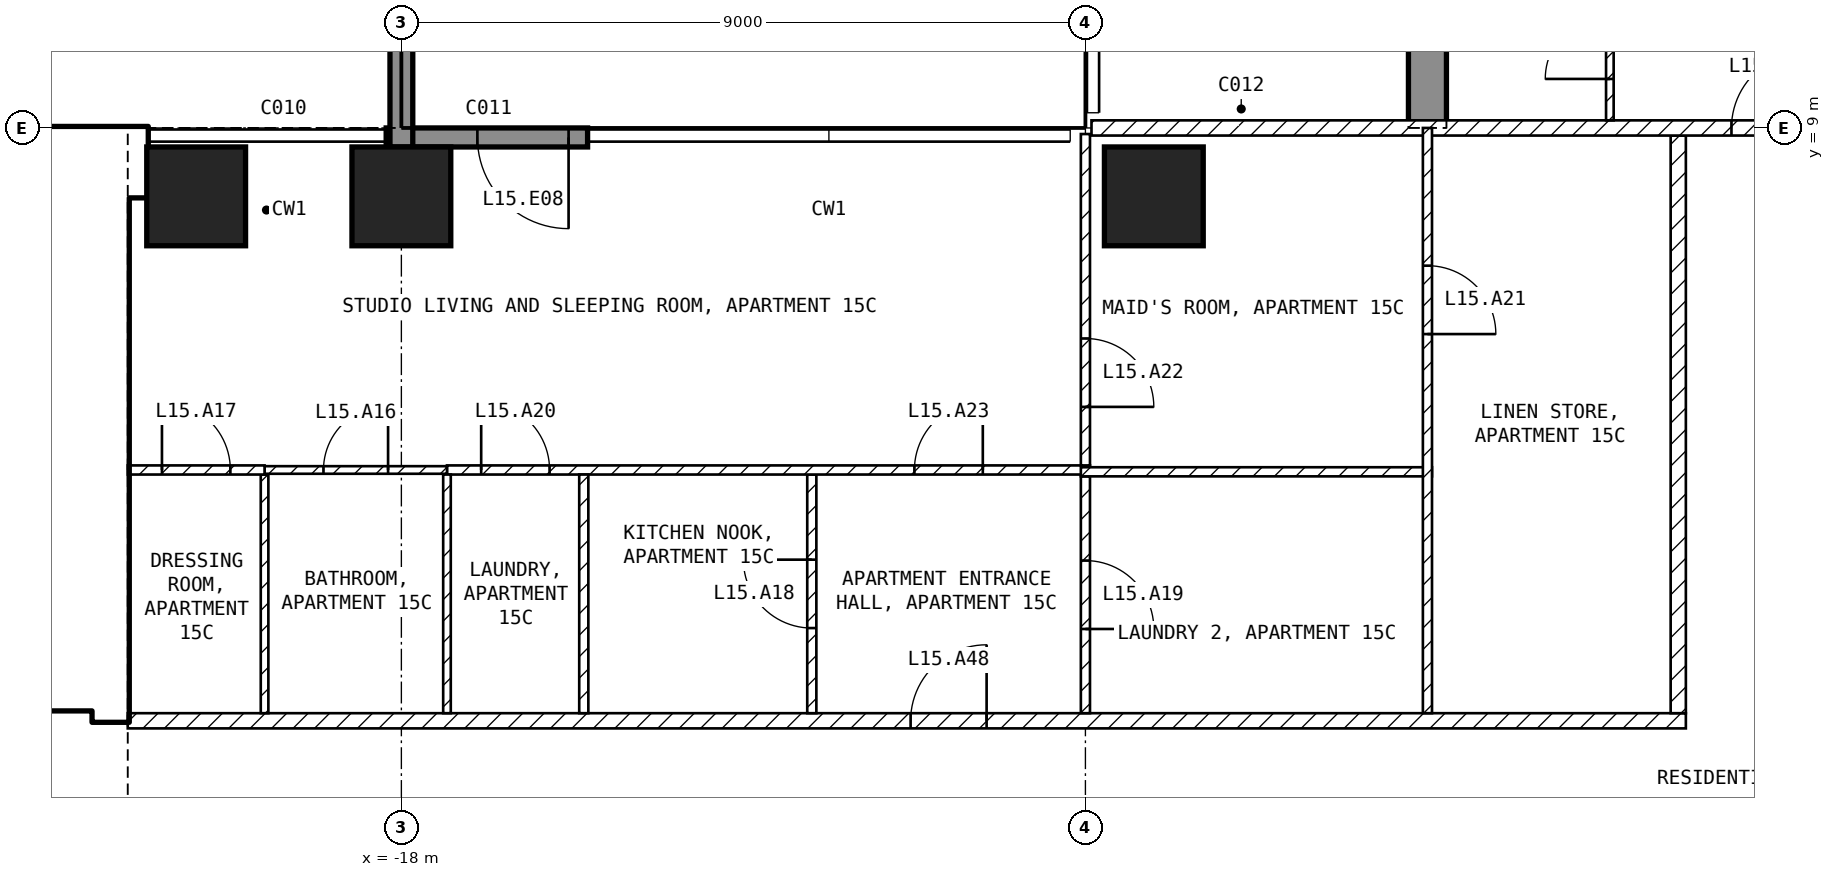
"""IFC4 building model, lengths in metres.
Left out: names, types, materials, properties, quantities, classifications, styles, units other than length and angle.
Written with IfcOpenShell. Run it as: python <this file> out.ifc"""

import sys

from ifc_helpers import new_model, si_unit, direction, frame, frame_2d, origin, origin_2d, place, context, subcontext, project, spatial, polyline, rectangle, outline, extrude, element, fill, save


model = new_model("IFC4")
c1 = context("Model", 3, precision=1e-05, world=origin(), true_north=direction((0.0, 1.0)))
c2 = subcontext(c1, "Body", "Model", "MODEL_VIEW")
j1 = project(units=[si_unit("LENGTHUNIT", "METRE"), si_unit("PLANEANGLEUNIT", "RADIAN")], contexts=[c1])
p1 = place(None, origin())
s1 = spatial("IfcSite", under=j1, at=p1, CompositionType="ELEMENT")
p2 = place(p1, origin())
s2 = spatial("IfcBuilding", under=s1, at=p2, CompositionType="ELEMENT")
p3 = place(p2, frame((0.0, 0.0, 71.5)))
s3 = spatial("IfcBuildingStorey", under=s2, at=p3, CompositionType="ELEMENT", Elevation=71.5)
for number, where, z_axis, x_axis in (
    (1, (-20.7, 8.1, -0.25), (0.0, 0.0, 1.0), (1.0, 0.0, 0.0)),
    (2, (-18.0, 8.1, -0.25), (0.0, 0.0, 1.0), (1.0, 0.0, 0.0)),
    (3, (-8.1, 8.1, -0.25), (0.0, 0.0, 1.0), (1.0, 0.0, 0.0)),
):
    element("IfcColumn", number, at=place(p3, frame(where, z_axis=z_axis, x_axis=x_axis)), inside=s3, PredefinedType="COLUMN", context=c2, shape_type="SweptSolid", body=[
        extrude(rectangle(XDim=1.3, YDim=1.3, at=origin_2d()), origin(), (0.0, 0.0, 1.0), 3.5),
    ])
p4 = place(p3, frame((-4.75, 9.0, -0.25), z_axis=(1.0, 0.0, 0.0), x_axis=(0.0, 1.0, 0.0)))
e4 = element("IfcWall", 4, at=p4, inside=s3, PredefinedType="SHEAR", context=c2, shape_type="SweptSolid", body=[
    extrude(outline(polyline([(0.0, 0.0), (2.1, 0.0), (2.1, 2.65), (4.5, 2.65), (4.5, 0.0), (9.9, 0.0), (9.9, 2.65), (12.3, 2.65), (12.3, 0.0), (16.45, 0.0), (16.45, 3.5), (0.0, 3.5), (0.0, 0.0)])), origin(), (0.0, 0.0, 1.0), 0.5),
])
p5 = place(p3, frame((-15.55, 8.875, 0.0), z_axis=(0.0, 0.0, 1.0), x_axis=(-1.0, 0.0, 0.0)))
e5 = element("IfcWall", 5, at=p5, inside=s3, PredefinedType="SOLIDWALL", context=c2, shape_type="SweptSolid", body=[
    extrude(rectangle(XDim=2.65, YDim=0.25, at=frame_2d((1.325, 0.0))), origin(), (0.0, 0.0, 1.0), 3.25),
])
p6 = place(p5, frame((0.25, 0.0, 0.0)))
e6 = element("IfcOpeningElement", 6, at=p6, cuts=e5, PredefinedType="OPENING", context=c2, shape_type="SweptSolid", body=[
    extrude(rectangle(XDim=1.2, YDim=2.4, at=frame_2d((0.6, 1.2))), frame((0.0, 0.135, 0.0), z_axis=(0.0, -1.0, 0.0), x_axis=(1.0, 0.0, 0.0)), (0.0, 0.0, 1.0), 0.27),
])
p7 = place(p3, frame((-18.0, 8.75, 0.0), z_axis=(0.0, 0.0, 1.0), x_axis=(0.0, 1.0, 0.0)))
e7 = element("IfcWall", 7, at=p7, inside=s3, PredefinedType="SOLIDWALL", context=c2, shape_type="SweptSolid", body=[
    extrude(rectangle(XDim=2.95, YDim=0.3, at=frame_2d((1.475, 0.0))), origin(), (0.0, 0.0, 1.0), 3.25),
])
p8 = place(p3, frame((-31.5, 8.55, 0.0), z_axis=(0.0, 0.0, 1.0), x_axis=(1.0, 0.0, 0.0)))
e8 = element("IfcWall", 8, at=p8, inside=s3, PredefinedType="SHEAR", context=c2, shape_type="SweptSolid", body=[
    extrude(rectangle(XDim=10.15, YDim=0.9, at=frame_2d((5.075, 0.0))), origin(), (0.0, 0.0, 1.0), 3.25),
])
p9 = place(p3, frame((-21.825, 1.2, 0.0), z_axis=(0.0, 0.0, 1.0), x_axis=(0.0, 1.0, 0.0)))
e9 = element("IfcWall", 9, at=p9, inside=s3, PredefinedType="SHEAR", context=c2, shape_type="SweptSolid", body=[
    extrude(rectangle(XDim=6.9, YDim=0.45, at=frame_2d((3.45, 0.0))), origin(), (0.0, 0.0, 1.0), 3.25),
])
p10 = place(p3, frame((-35.1, 1.45, 0.0), z_axis=(0.0, 0.0, 1.0), x_axis=(1.0, 0.0, 0.0)))
e10 = element("IfcWall", 10, at=p10, inside=s3, PredefinedType="SOLIDWALL", context=c2, shape_type="SweptSolid", body=[
    extrude(rectangle(XDim=13.05, YDim=0.2, at=frame_2d((6.525, 0.0))), origin(), (0.0, 0.0, 1.0), 3.25),
])
p11 = place(p10, frame((11.3, 0.0, 0.0)))
e11 = element("IfcOpeningElement", 11, at=p11, cuts=e10, PredefinedType="OPENING", context=c2, shape_type="SweptSolid", body=[
    extrude(rectangle(XDim=1.0, YDim=2.1, at=frame_2d((0.5, 1.05))), frame((0.0, 0.11, 0.0), z_axis=(0.0, -1.0, 0.0), x_axis=(1.0, 0.0, 0.0)), (0.0, 0.0, 1.0), 0.22),
])
p12 = place(p10, frame((8.8, 0.0, 0.0)))
e12 = element("IfcOpeningElement", 12, at=p12, cuts=e10, PredefinedType="OPENING", context=c2, shape_type="SweptSolid", body=[
    extrude(rectangle(XDim=1.0, YDim=2.1, at=frame_2d((0.5, 1.05))), frame((0.0, 0.11, 0.0), z_axis=(0.0, -1.0, 0.0), x_axis=(1.0, 0.0, 0.0)), (0.0, 0.0, 1.0), 0.22),
])
p13 = place(p3, frame((-28.35, 5.15, 0.0), z_axis=(0.0, 0.0, 1.0), x_axis=(1.0, 0.0, 0.0)))
e13 = element("IfcWall", 13, at=p13, inside=s3, PredefinedType="SOLIDWALL", context=c2, shape_type="SweptSolid", body=[
    extrude(rectangle(XDim=6.3, YDim=0.2, at=frame_2d((3.15, 0.0))), origin(), (0.0, 0.0, 1.0), 3.25),
])
p14 = place(p13, frame((5.1, 0.0, 0.0)))
e14 = element("IfcOpeningElement", 14, at=p14, cuts=e13, PredefinedType="OPENING", context=c2, shape_type="SweptSolid", body=[
    extrude(rectangle(XDim=1.0, YDim=2.1, at=frame_2d((0.5, 1.05))), frame((0.0, 0.11, 0.0), z_axis=(0.0, -1.0, 0.0), x_axis=(1.0, 0.0, 0.0)), (0.0, 0.0, 1.0), 0.22),
])
p15 = place(p3, frame((-21.6, 1.2, 0.0), z_axis=(0.0, 0.0, 1.0), x_axis=(1.0, 0.0, 0.0)))
e15 = element("IfcWall", 15, at=p15, inside=s3, PredefinedType="PARTITIONING", context=c2, shape_type="SweptSolid", body=[
    extrude(rectangle(XDim=20.5, YDim=0.2, at=frame_2d((10.25, 0.0))), origin(), (0.0, 0.0, 1.0), 3.25),
])
p16 = place(p15, frame((10.3, 0.0, 0.0)))
e16 = element("IfcOpeningElement", 16, at=p16, cuts=e15, PredefinedType="OPENING", context=c2, shape_type="SweptSolid", body=[
    extrude(rectangle(XDim=1.0, YDim=2.1, at=frame_2d((0.5, 1.05))), frame((0.0, 0.11, 0.0), z_axis=(0.0, -1.0, 0.0), x_axis=(1.0, 0.0, 0.0)), (0.0, 0.0, 1.0), 0.22),
])
p17 = place(p3, frame((-1.2, 1.3, 0.0), z_axis=(0.0, 0.0, 1.0), x_axis=(0.0, 1.0, 0.0)))
e17 = element("IfcWall", 17, at=p17, inside=s3, PredefinedType="PARTITIONING", context=c2, shape_type="SweptSolid", body=[
    extrude(rectangle(XDim=7.6, YDim=0.2, at=frame_2d((3.8, 0.0))), origin(), (0.0, 0.0, 1.0), 3.25),
])
p18 = place(p3, frame((-8.92, 9.0, 0.0), z_axis=(0.0, 0.0, 1.0), x_axis=(1.0, 0.0, 0.0)))
e18 = element("IfcWall", 18, at=p18, inside=s3, PredefinedType="PARTITIONING", context=c2, shape_type="SweptSolid", body=[
    extrude(rectangle(XDim=17.84, YDim=0.2, at=frame_2d((8.92, 0.0))), origin(), (0.0, 0.0, 1.0), 3.25),
])
p19 = place(p18, frame((8.42, 0.0, 0.0)))
e19 = element("IfcOpeningElement", 19, at=p19, cuts=e18, PredefinedType="OPENING", context=c2, shape_type="SweptSolid", body=[
    extrude(rectangle(XDim=1.0, YDim=2.1, at=frame_2d((0.5, 1.05))), frame((0.0, 0.11, 0.0), z_axis=(0.0, -1.0, 0.0), x_axis=(1.0, 0.0, 0.0)), (0.0, 0.0, 1.0), 0.22),
])
p20 = place(p3, frame((-12.6, 1.3, 0.0), z_axis=(0.0, 0.0, 1.0), x_axis=(0.0, 1.0, 0.0)))
e20 = element("IfcWall", 20, at=p20, inside=s3, PredefinedType="PARTITIONING", context=c2, shape_type="SweptSolid", body=[
    extrude(rectangle(XDim=3.14, YDim=0.12, at=frame_2d((1.57, 0.0))), origin(), (0.0, 0.0, 1.0), 3.25),
])
p21 = place(p20, frame((1.12, 0.0, 0.0)))
e21 = element("IfcOpeningElement", 21, at=p21, cuts=e20, PredefinedType="OPENING", context=c2, shape_type="SweptSolid", body=[
    extrude(rectangle(XDim=0.9, YDim=2.1, at=frame_2d((0.45, 1.05))), frame((0.0, 0.07, 0.0), z_axis=(0.0, -1.0, 0.0), x_axis=(1.0, 0.0, 0.0)), (0.0, 0.0, 1.0), 0.14),
])
p22 = place(p3, frame((-17.4, 4.5, 0.0), z_axis=(0.0, 0.0, 1.0), x_axis=(1.0, 0.0, 0.0)))
e22 = element("IfcWall", 22, at=p22, inside=s3, PredefinedType="PARTITIONING", context=c2, shape_type="SweptSolid", body=[
    extrude(rectangle(XDim=8.46, YDim=0.12, at=frame_2d((4.23, 0.0))), origin(), (0.0, 0.0, 1.0), 3.25),
])
p23 = place(p22, frame((0.45, 0.0, 0.0)))
e23 = element("IfcOpeningElement", 23, at=p23, cuts=e22, PredefinedType="OPENING", context=c2, shape_type="SweptSolid", body=[
    extrude(rectangle(XDim=0.9, YDim=2.1, at=frame_2d((0.45, 1.05))), frame((0.0, 0.07, 0.0), z_axis=(0.0, -1.0, 0.0), x_axis=(1.0, 0.0, 0.0)), (0.0, 0.0, 1.0), 0.14),
])
p24 = place(p22, frame((6.15, 0.0, 0.0)))
e24 = element("IfcOpeningElement", 24, at=p24, cuts=e22, PredefinedType="OPENING", context=c2, shape_type="SweptSolid", body=[
    extrude(rectangle(XDim=0.9, YDim=2.1, at=frame_2d((0.45, 1.05))), frame((0.0, 0.07, 0.0), z_axis=(0.0, -1.0, 0.0), x_axis=(1.0, 0.0, 0.0)), (0.0, 0.0, 1.0), 0.14),
])
p25 = place(p3, frame((-9.0, 4.416, 0.0), z_axis=(0.0, 0.0, 1.0), x_axis=(0.0, -1.0, 0.0)))
e25 = element("IfcWall", 25, at=p25, inside=s3, PredefinedType="PARTITIONING", context=c2, shape_type="SweptSolid", body=[
    extrude(rectangle(XDim=3.116, YDim=0.12, at=frame_2d((1.558, 0.0))), origin(), (0.0, 0.0, 1.0), 3.25),
])
p26 = place(p25, frame((1.108, 0.0, 0.0)))
e26 = element("IfcOpeningElement", 26, at=p26, cuts=e25, PredefinedType="OPENING", context=c2, shape_type="SweptSolid", body=[
    extrude(rectangle(XDim=0.9, YDim=2.1, at=frame_2d((0.45, 1.05))), frame((0.0, 0.07, 0.0), z_axis=(0.0, -1.0, 0.0), x_axis=(1.0, 0.0, 0.0)), (0.0, 0.0, 1.0), 0.14),
])
p27 = place(p3, frame((-15.6, 1.3, 0.0), z_axis=(0.0, 0.0, 1.0), x_axis=(0.0, 1.0, 0.0)))
e27 = element("IfcWall", 27, at=p27, inside=s3, PredefinedType="PARTITIONING", context=c2, shape_type="SweptSolid", body=[
    extrude(rectangle(XDim=3.14, YDim=0.12, at=frame_2d((1.57, 0.0))), origin(), (0.0, 0.0, 1.0), 3.25),
])
for number, where, z_axis, x_axis in (
    (28, (-17.4, 1.3, 0.0), (0.0, 0.0, 1.0), (0.0, 1.0, 0.0)),
    (29, (-19.8, 1.3, 0.0), (0.0, 0.0, 1.0), (0.0, 1.0, 0.0)),
):
    element("IfcWall", number, at=place(p3, frame(where, z_axis=z_axis, x_axis=x_axis)), inside=s3, PredefinedType="PARTITIONING", context=c2, shape_type="SweptSolid", body=[
        extrude(rectangle(XDim=3.14, YDim=0.1, at=frame_2d((1.57, 0.0))), origin(), (0.0, 0.0, 1.0), 3.25),
    ])
p28 = place(p3, frame((-19.8, 4.5, 0.0), z_axis=(0.0, 0.0, 1.0), x_axis=(1.0, 0.0, 0.0)))
e30 = element("IfcWall", 30, at=p28, inside=s3, PredefinedType="PARTITIONING", context=c2, shape_type="SweptSolid", body=[
    extrude(rectangle(XDim=2.4, YDim=0.1, at=frame_2d((1.2, 0.0))), origin(), (0.0, 0.0, 1.0), 3.25),
])
p29 = place(p28, frame((0.775, 0.0, 0.0)))
e31 = element("IfcOpeningElement", 31, at=p29, cuts=e30, PredefinedType="OPENING", context=c2, shape_type="SweptSolid", body=[
    extrude(rectangle(XDim=0.85, YDim=2.1, at=frame_2d((0.425, 1.05))), frame((0.0, 0.06, 0.0), z_axis=(0.0, -1.0, 0.0), x_axis=(1.0, 0.0, 0.0)), (0.0, 0.0, 1.0), 0.12),
])
p30 = place(p3, frame((-21.6, 4.5, 0.0), z_axis=(0.0, 0.0, 1.0), x_axis=(1.0, 0.0, 0.0)))
e32 = element("IfcWall", 32, at=p30, inside=s3, PredefinedType="PARTITIONING", context=c2, shape_type="SweptSolid", body=[
    extrude(rectangle(XDim=1.8, YDim=0.12, at=frame_2d((0.9, 0.0))), origin(), (0.0, 0.0, 1.0), 3.25),
])
p31 = place(p30, frame((0.45, 0.0, 0.0)))
e33 = element("IfcOpeningElement", 33, at=p31, cuts=e32, PredefinedType="OPENING", context=c2, shape_type="SweptSolid", body=[
    extrude(rectangle(XDim=0.9, YDim=2.1, at=frame_2d((0.45, 1.05))), frame((0.0, 0.07, 0.0), z_axis=(0.0, -1.0, 0.0), x_axis=(1.0, 0.0, 0.0)), (0.0, 0.0, 1.0), 0.14),
])
p32 = place(p3, frame((-9.0, 8.92, 0.0), z_axis=(0.0, 0.0, 1.0), x_axis=(0.0, -1.0, 0.0)))
e34 = element("IfcWall", 34, at=p32, inside=s3, PredefinedType="PARTITIONING", context=c2, shape_type="SweptSolid", body=[
    extrude(rectangle(XDim=4.36, YDim=0.12, at=frame_2d((2.18, 0.0))), origin(), (0.0, 0.0, 1.0), 3.25),
])
p33 = place(p32, frame((2.69, 0.0, 0.0)))
e35 = element("IfcOpeningElement", 35, at=p33, cuts=e34, PredefinedType="OPENING", context=c2, shape_type="SweptSolid", body=[
    extrude(rectangle(XDim=0.9, YDim=2.1, at=frame_2d((0.45, 1.05))), frame((0.0, 0.07, 0.0), z_axis=(0.0, -1.0, 0.0), x_axis=(1.0, 0.0, 0.0)), (0.0, 0.0, 1.0), 0.14),
])
p34 = place(p3, frame((-9.06, 4.476, 0.0), z_axis=(0.0, 0.0, 1.0), x_axis=(1.0, 0.0, 0.0)))
e36 = element("IfcWall", 36, at=p34, inside=s3, PredefinedType="PARTITIONING", context=c2, shape_type="SweptSolid", body=[
    extrude(rectangle(XDim=4.62, YDim=0.12, at=frame_2d((2.31, 0.0))), origin(), (0.0, 0.0, 1.0), 3.25),
])
p35 = place(p3, frame((-4.5, 9.0, 0.0), z_axis=(0.0, 0.0, 1.0), x_axis=(0.0, -1.0, 0.0)))
e37 = element("IfcWall", 37, at=p35, inside=s3, PredefinedType="PARTITIONING", context=c2, shape_type="SweptSolid", body=[
    extrude(rectangle(XDim=7.7, YDim=0.12, at=frame_2d((3.85, 0.0))), origin(), (0.0, 0.0, 1.0), 3.25),
])
p36 = place(p35, frame((1.812, 0.0, 0.0)))
e38 = element("IfcOpeningElement", 38, at=p36, cuts=e37, PredefinedType="OPENING", context=c2, shape_type="SweptSolid", body=[
    extrude(rectangle(XDim=0.9, YDim=2.1, at=frame_2d((0.45, 1.05))), frame((0.0, 0.07, 0.0), z_axis=(0.0, -1.0, 0.0), x_axis=(1.0, 0.0, 0.0)), (0.0, 0.0, 1.0), 0.14),
])
p37 = place(p3, frame((-2.1, 9.1, 0.0), z_axis=(0.0, 0.0, 1.0), x_axis=(0.0, 1.0, 0.0)))
e39 = element("IfcWall", 39, at=p37, inside=s3, PredefinedType="PARTITIONING", context=c2, shape_type="SweptSolid", body=[
    extrude(rectangle(XDim=1.94, YDim=0.1, at=frame_2d((0.97, 0.0))), origin(), (0.0, 0.0, 1.0), 3.25),
])
p38 = place(p37, frame((0.545, 0.0, 0.0)))
e40 = element("IfcOpeningElement", 40, at=p38, cuts=e39, PredefinedType="OPENING", context=c2, shape_type="SweptSolid", body=[
    extrude(rectangle(XDim=0.85, YDim=2.1, at=frame_2d((0.425, 1.05))), frame((0.0, 0.06, 0.0), z_axis=(0.0, -1.0, 0.0), x_axis=(1.0, 0.0, 0.0)), (0.0, 0.0, 1.0), 0.12),
])
p39 = place(p6, origin())
e41 = element("IfcDoor", 41, at=p39, inside=s3, OperationType="SINGLE_SWING_LEFT", PredefinedType="DOOR", context=c2, shape_type="SweptSolid", body=[
    extrude(rectangle(XDim=1.2, YDim=2.4, at=frame_2d((0.6, 1.2))), frame((0.0, 0.025, 0.0), z_axis=(0.0, -1.0, 0.0), x_axis=(1.0, 0.0, 0.0)), (0.0, 0.0, 1.0), 0.05),
])
fill(e6, e41)
p40 = place(p14, origin())
e42 = element("IfcDoor", 42, at=p40, inside=s3, OperationType="SINGLE_SWING_LEFT", PredefinedType="DOOR", context=c2, shape_type="SweptSolid", body=[
    extrude(rectangle(XDim=1.0, YDim=2.1, at=frame_2d((0.5, 1.05))), frame((0.0, 0.025, 0.0), z_axis=(0.0, -1.0, 0.0), x_axis=(1.0, 0.0, 0.0)), (0.0, 0.0, 1.0), 0.05),
])
fill(e14, e42)
p41 = place(p29, origin())
e43 = element("IfcDoor", 43, at=p41, inside=s3, OperationType="SINGLE_SWING_RIGHT", PredefinedType="DOOR", context=c2, shape_type="SweptSolid", body=[
    extrude(rectangle(XDim=0.85, YDim=2.1, at=frame_2d((0.425, 1.05))), frame((0.0, 0.025, 0.0), z_axis=(0.0, -1.0, 0.0), x_axis=(1.0, 0.0, 0.0)), (0.0, 0.0, 1.0), 0.05),
])
fill(e31, e43)
p42 = place(p31, origin())
e44 = element("IfcDoor", 44, at=p42, inside=s3, OperationType="SINGLE_SWING_LEFT", PredefinedType="DOOR", context=c2, shape_type="SweptSolid", body=[
    extrude(rectangle(XDim=0.9, YDim=2.1, at=frame_2d((0.45, 1.05))), frame((0.0, 0.025, 0.0), z_axis=(0.0, -1.0, 0.0), x_axis=(1.0, 0.0, 0.0)), (0.0, 0.0, 1.0), 0.05),
])
fill(e33, e44)
p43 = place(p21, origin())
e45 = element("IfcDoor", 45, at=p43, inside=s3, OperationType="SINGLE_SWING_RIGHT", PredefinedType="DOOR", context=c2, shape_type="SweptSolid", body=[
    extrude(rectangle(XDim=0.9, YDim=2.1, at=frame_2d((0.45, 1.05))), frame((0.0, 0.025, 0.0), z_axis=(0.0, -1.0, 0.0), x_axis=(1.0, 0.0, 0.0)), (0.0, 0.0, 1.0), 0.05),
])
fill(e21, e45)
p44 = place(p26, origin())
e46 = element("IfcDoor", 46, at=p44, inside=s3, OperationType="SINGLE_SWING_RIGHT", PredefinedType="DOOR", context=c2, shape_type="SweptSolid", body=[
    extrude(rectangle(XDim=0.9, YDim=2.1, at=frame_2d((0.45, 1.05))), frame((0.0, 0.025, 0.0), z_axis=(0.0, -1.0, 0.0), x_axis=(1.0, 0.0, 0.0)), (0.0, 0.0, 1.0), 0.05),
])
fill(e26, e46)
p45 = place(p23, origin())
e47 = element("IfcDoor", 47, at=p45, inside=s3, OperationType="SINGLE_SWING_LEFT", PredefinedType="DOOR", context=c2, shape_type="SweptSolid", body=[
    extrude(rectangle(XDim=0.9, YDim=2.1, at=frame_2d((0.45, 1.05))), frame((0.0, 0.025, 0.0), z_axis=(0.0, -1.0, 0.0), x_axis=(1.0, 0.0, 0.0)), (0.0, 0.0, 1.0), 0.05),
])
fill(e23, e47)
p46 = place(p36, origin())
e48 = element("IfcDoor", 48, at=p46, inside=s3, OperationType="SINGLE_SWING_RIGHT", PredefinedType="DOOR", context=c2, shape_type="SweptSolid", body=[
    extrude(rectangle(XDim=0.9, YDim=2.1, at=frame_2d((0.45, 1.05))), frame((0.0, 0.025, 0.0), z_axis=(0.0, -1.0, 0.0), x_axis=(1.0, 0.0, 0.0)), (0.0, 0.0, 1.0), 0.05),
])
fill(e38, e48)
p47 = place(p33, origin())
e49 = element("IfcDoor", 49, at=p47, inside=s3, OperationType="SINGLE_SWING_RIGHT", PredefinedType="DOOR", context=c2, shape_type="SweptSolid", body=[
    extrude(rectangle(XDim=0.9, YDim=2.1, at=frame_2d((0.45, 1.05))), frame((0.0, 0.025, 0.0), z_axis=(0.0, -1.0, 0.0), x_axis=(1.0, 0.0, 0.0)), (0.0, 0.0, 1.0), 0.05),
])
fill(e35, e49)
p48 = place(p24, origin())
e50 = element("IfcDoor", 50, at=p48, inside=s3, OperationType="SINGLE_SWING_RIGHT", PredefinedType="DOOR", context=c2, shape_type="SweptSolid", body=[
    extrude(rectangle(XDim=0.9, YDim=2.1, at=frame_2d((0.45, 1.05))), frame((0.0, 0.025, 0.0), z_axis=(0.0, -1.0, 0.0), x_axis=(1.0, 0.0, 0.0)), (0.0, 0.0, 1.0), 0.05),
])
fill(e24, e50)
p49 = place(p19, origin())
e51 = element("IfcDoor", 51, at=p49, inside=s3, OperationType="SINGLE_SWING_RIGHT", PredefinedType="DOOR", context=c2, shape_type="SweptSolid", body=[
    extrude(rectangle(XDim=1.0, YDim=2.1, at=frame_2d((0.5, 1.05))), frame((0.0, 0.025, 0.0), z_axis=(0.0, -1.0, 0.0), x_axis=(1.0, 0.0, 0.0)), (0.0, 0.0, 1.0), 0.05),
])
fill(e19, e51)
p50 = place(p38, origin())
e52 = element("IfcDoor", 52, at=p50, inside=s3, OperationType="SINGLE_SWING_LEFT", PredefinedType="DOOR", context=c2, shape_type="SweptSolid", body=[
    extrude(rectangle(XDim=0.85, YDim=2.1, at=frame_2d((0.425, 1.05))), frame((0.0, 0.025, 0.0), z_axis=(0.0, -1.0, 0.0), x_axis=(1.0, 0.0, 0.0)), (0.0, 0.0, 1.0), 0.05),
])
fill(e40, e52)
p51 = place(p16, origin())
e53 = element("IfcDoor", 53, at=p51, inside=s3, OperationType="SINGLE_SWING_RIGHT", PredefinedType="DOOR", context=c2, shape_type="SweptSolid", body=[
    extrude(rectangle(XDim=1.0, YDim=2.1, at=frame_2d((0.5, 1.05))), frame((0.0, 0.025, 0.0), z_axis=(0.0, -1.0, 0.0), x_axis=(1.0, 0.0, 0.0)), (0.0, 0.0, 1.0), 0.05),
])
fill(e16, e53)
save(model, sys.argv[1])
